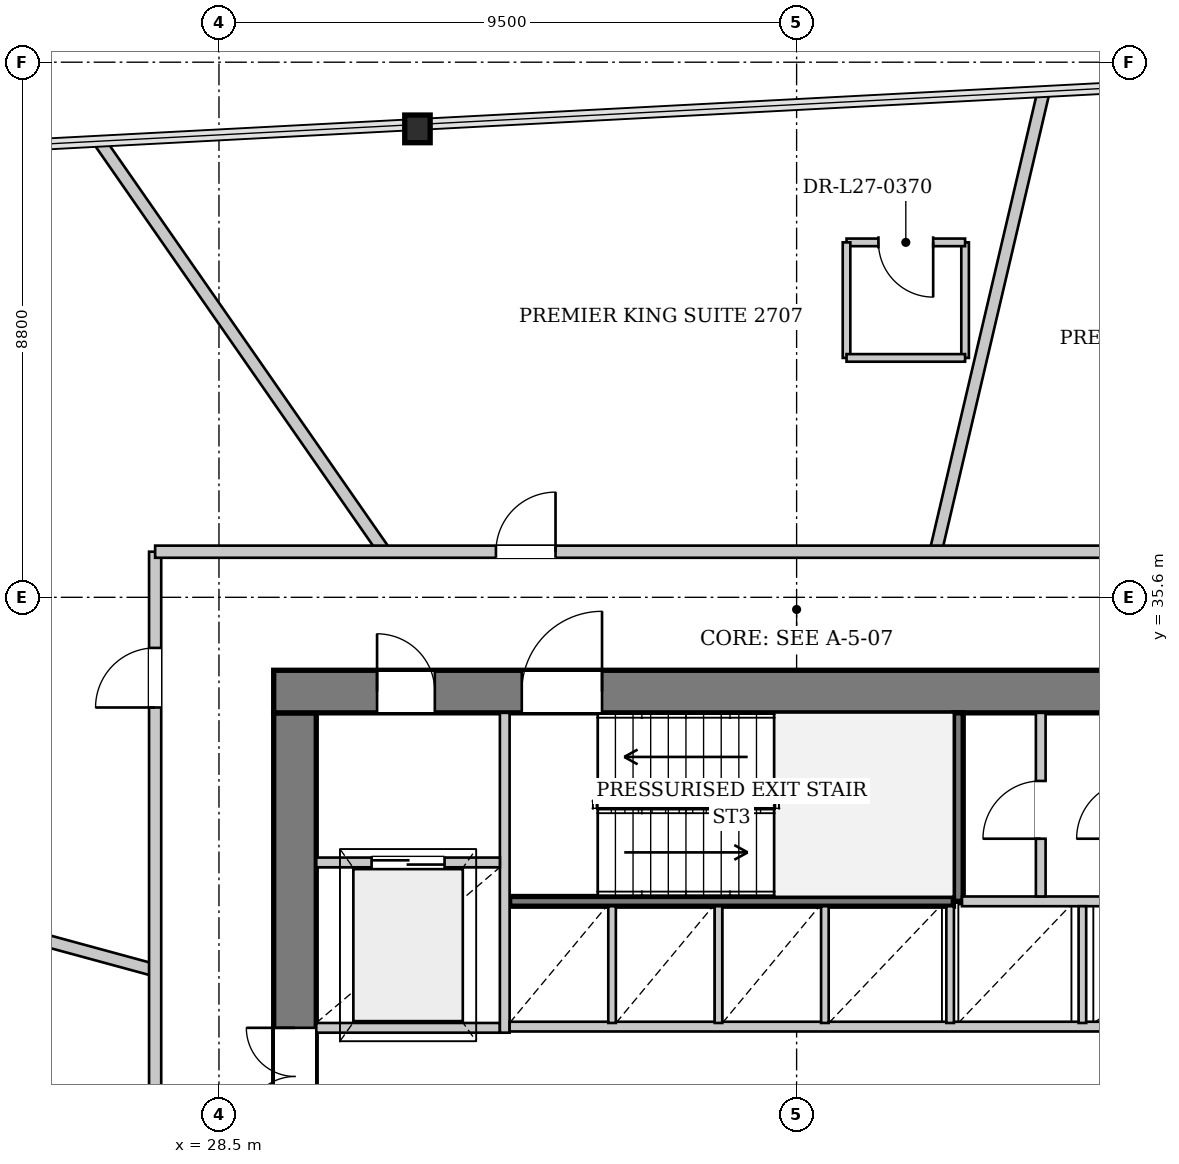
"""IFC4 building model, lengths in metres.
Left out: names, types, materials, properties, quantities, classifications, styles, units other than length and angle.
Written with IfcOpenShell. Run it as: python <this file> out.ifc"""

import sys

from ifc_helpers import new_model, si_unit, direction, frame, frame_2d, origin, origin_2d, place, context, subcontext, project, spatial, rectangle, i_section, extrude, source, transform, mapped, element, fill, save


model = new_model("IFC4")
c1 = context("Model", 3, precision=1e-05, world=origin(), true_north=direction((0.0, 1.0)))
c2 = subcontext(c1, "Body", "Model", "MODEL_VIEW")
j1 = project(units=[si_unit("LENGTHUNIT", "METRE"), si_unit("PLANEANGLEUNIT", "RADIAN")], contexts=[c1])
p1 = place(None, origin())
s1 = spatial("IfcSite", under=j1, at=p1, CompositionType="ELEMENT")
p2 = place(p1, origin())
s2 = spatial("IfcBuilding", under=s1, at=p2, CompositionType="ELEMENT")
p3 = place(p2, frame((0.0, 0.0, 105.7)))
s3 = spatial("IfcBuildingStorey", under=s2, at=p3, CompositionType="ELEMENT", Elevation=105.7)
m1 = source(origin(), c2, "Body", "SweptSolid", [
    extrude(i_section(OverallWidth=0.418, OverallDepth=0.455, WebThickness=0.038, FlangeThickness=0.059, at=origin_2d()), origin(), (0.0, 0.0, 1.0), 3.399),
])
p4 = place(p3, frame((31.897, 43.383, 0.0), z_axis=(-0.078216564077, -0.046685736134, 0.995842663851), x_axis=(0.512523153055, -0.858673405657, 0.0)))
e1 = element("IfcColumn", 1, at=p4, inside=s3, PredefinedType="COLUMN", context=c2, shape_type="MappedRepresentation", body=[
    mapped(m1, transform((0.0, 0.0, 0.0), x_axis=(1.0, 0.0, 0.0), y_axis=(0.0, 1.0, 0.0), z_axis=(0.0, 0.0, 1.0), scale=1.0)),
])
p5 = place(p3, frame((29.75, 19.5, 0.0), z_axis=(0.0, 0.0, 1.0), x_axis=(0.0, 1.0, 0.0)))
e2 = element("IfcWall", 2, at=p5, inside=s3, PredefinedType="SHEAR", context=c2, shape_type="SweptSolid", body=[
    extrude(rectangle(XDim=14.2, YDim=0.7, at=frame_2d((7.1, 0.0))), origin(), (0.0, 0.0, 1.0), 3.3),
])
p6 = place(p5, frame((7.42, 0.0, 0.0)))
e3 = element("IfcOpeningElement", 3, at=p6, cuts=e2, PredefinedType="OPENING", context=c2, shape_type="SweptSolid", body=[
    extrude(rectangle(XDim=1.6, YDim=2.2, at=frame_2d((0.8, 1.1))), frame((0.0, 0.36, 0.0), z_axis=(0.0, -1.0, 0.0), x_axis=(1.0, 0.0, 0.0)), (0.0, 0.0, 1.0), 0.72),
])
p7 = place(p3, frame((29.4, 34.05, 0.0), z_axis=(0.0, 0.0, 1.0), x_axis=(1.0, 0.0, 0.0)))
e4 = element("IfcWall", 4, at=p7, inside=s3, PredefinedType="SHEAR", context=c2, shape_type="SweptSolid", body=[
    extrude(rectangle(XDim=17.2, YDim=0.7, at=frame_2d((8.6, 0.0))), origin(), (0.0, 0.0, 1.0), 3.3),
])
p8 = place(p7, frame((1.7, 0.0, 0.0)))
e5 = element("IfcOpeningElement", 5, at=p8, cuts=e4, PredefinedType="OPENING", context=c2, shape_type="SweptSolid", body=[
    extrude(rectangle(XDim=0.95, YDim=2.1, at=frame_2d((0.475, 1.05))), frame((0.0, 0.36, 0.0), z_axis=(0.0, -1.0, 0.0), x_axis=(1.0, 0.0, 0.0)), (0.0, 0.0, 1.0), 0.72),
])
p9 = place(p7, frame((4.08, 0.0, 0.0)))
e6 = element("IfcOpeningElement", 6, at=p9, cuts=e4, PredefinedType="OPENING", context=c2, shape_type="SweptSolid", body=[
    extrude(rectangle(XDim=1.32, YDim=2.2, at=frame_2d((0.66, 1.1))), frame((0.0, 0.36, 0.0), z_axis=(0.0, -1.0, 0.0), x_axis=(1.0, 0.0, 0.0)), (0.0, 0.0, 1.0), 0.72),
])
p10 = place(p7, frame((15.15, 0.0, 0.0)))
e7 = element("IfcOpeningElement", 7, at=p10, cuts=e4, PredefinedType="OPENING", context=c2, shape_type="SweptSolid", body=[
    extrude(rectangle(XDim=0.95, YDim=2.1, at=frame_2d((0.475, 1.05))), frame((0.0, 0.36, 0.0), z_axis=(0.0, -1.0, 0.0), x_axis=(1.0, 0.0, 0.0)), (0.0, 0.0, 1.0), 0.72),
])
p11 = place(p3, frame((33.28, 30.6, 0.0), z_axis=(0.0, 0.0, 1.0), x_axis=(1.0, 0.0, 0.0)))
e8 = element("IfcWall", 8, at=p11, inside=s3, PredefinedType="PARTITIONING", context=c2, shape_type="SweptSolid", body=[
    extrude(rectangle(XDim=7.3, YDim=0.16, at=frame_2d((3.65, 0.0))), origin(), (0.0, 0.0, 1.0), 3.3),
])
p12 = place(p3, frame((40.66, 30.6, 0.0), z_axis=(0.0, 0.0, 1.0), x_axis=(0.0, 1.0, 0.0)))
e9 = element("IfcWall", 9, at=p12, inside=s3, PredefinedType="PARTITIONING", context=c2, shape_type="SweptSolid", body=[
    extrude(rectangle(XDim=3.1, YDim=0.16, at=frame_2d((1.55, 0.0))), origin(), (0.0, 0.0, 1.0), 3.3),
])
p13 = place(p3, frame((30.1, 28.52, 0.0), z_axis=(0.0, 0.0, 1.0), x_axis=(1.0, 0.0, 0.0)))
e10 = element("IfcWall", 10, at=p13, inside=s3, PredefinedType="PARTITIONING", context=c2, shape_type="SweptSolid", body=[
    extrude(rectangle(XDim=3.02, YDim=0.16, at=frame_2d((1.51, 0.0))), origin(), (0.0, 0.0, 1.0), 3.3),
])
p14 = place(p3, frame((33.2, 28.44, 0.0), z_axis=(0.0, 0.0, 1.0), x_axis=(0.0, 1.0, 0.0)))
e11 = element("IfcWall", 11, at=p14, inside=s3, PredefinedType="PARTITIONING", context=c2, shape_type="SweptSolid", body=[
    extrude(rectangle(XDim=5.26, YDim=0.16, at=frame_2d((2.63, 0.0))), origin(), (0.0, 0.0, 1.0), 3.3),
])
p15 = place(p3, frame((30.1, 31.24, 0.0), z_axis=(0.0, 0.0, 1.0), x_axis=(1.0, 0.0, 0.0)))
e12 = element("IfcWall", 12, at=p15, inside=s3, PredefinedType="PARTITIONING", context=c2, shape_type="SweptSolid", body=[
    extrude(rectangle(XDim=3.02, YDim=0.16, at=frame_2d((1.51, 0.0))), origin(), (0.0, 0.0, 1.0), 3.3),
])
p16 = place(p15, frame((0.91, 0.0, 0.0)))
e13 = element("IfcOpeningElement", 13, at=p16, cuts=e12, PredefinedType="OPENING", context=c2, shape_type="SweptSolid", body=[
    extrude(rectangle(XDim=1.2, YDim=2.2, at=frame_2d((0.6, 1.1))), frame((0.0, 0.09, 0.0), z_axis=(0.0, -1.0, 0.0), x_axis=(1.0, 0.0, 0.0)), (0.0, 0.0, 1.0), 0.18),
])
p17 = place(p3, frame((33.28, 28.54, 0.0), z_axis=(0.0, 0.0, 1.0), x_axis=(1.0, 0.0, 0.0)))
e14 = element("IfcWall", 14, at=p17, inside=s3, PredefinedType="PARTITIONING", context=c2, shape_type="SweptSolid", body=[
    extrude(rectangle(XDim=12.62, YDim=0.16, at=frame_2d((6.31, 0.0))), origin(), (0.0, 0.0, 1.0), 3.3),
])
p18 = place(p3, frame((40.72, 30.6, 0.0), z_axis=(0.0, 0.0, 1.0), x_axis=(1.0, 0.0, 0.0)))
e15 = element("IfcWall", 15, at=p18, inside=s3, PredefinedType="PARTITIONING", context=c2, shape_type="SweptSolid", body=[
    extrude(rectangle(XDim=5.18, YDim=0.16, at=frame_2d((2.59, 0.0))), origin(), (0.0, 0.0, 1.0), 3.3),
])
for number, where, z_axis, x_axis in (
    (16, (34.965, 28.6, 0.0), (0.0, 0.0, 1.0), (0.0, 1.0, 0.0)),
    (17, (36.715, 28.6, 0.0), (0.0, 0.0, 1.0), (0.0, 1.0, 0.0)),
    (18, (38.465, 28.6, 0.0), (0.0, 0.0, 1.0), (0.0, 1.0, 0.0)),
    (19, (40.525, 28.6, 0.0), (0.0, 0.0, 1.0), (0.0, 1.0, 0.0)),
    (20, (42.7, 28.6, 0.0), (0.0, 0.0, 1.0), (0.0, 1.0, 0.0)),
):
    element("IfcWall", number, at=place(p3, frame(where, z_axis=z_axis, x_axis=x_axis)), inside=s3, PredefinedType="PARTITIONING", context=c2, shape_type="SweptSolid", body=[
        extrude(rectangle(XDim=1.92, YDim=0.125, at=frame_2d((0.96, 0.0))), origin(), (0.0, 0.0, 1.0), 3.3),
    ])
p19 = place(p3, frame((42.015, 30.68, 0.0), z_axis=(0.0, 0.0, 1.0), x_axis=(0.0, 1.0, 0.0)))
e21 = element("IfcWall", 21, at=p19, inside=s3, PredefinedType="PARTITIONING", context=c2, shape_type="SweptSolid", body=[
    extrude(rectangle(XDim=3.02, YDim=0.16, at=frame_2d((1.51, 0.0))), origin(), (0.0, 0.0, 1.0), 3.3),
])
p20 = place(p19, frame((0.95, 0.0, 0.0)))
e22 = element("IfcOpeningElement", 22, at=p20, cuts=e21, PredefinedType="OPENING", context=c2, shape_type="SweptSolid", body=[
    extrude(rectangle(XDim=0.95, YDim=2.1, at=frame_2d((0.475, 1.05))), frame((0.0, 0.09, 0.0), z_axis=(0.0, -1.0, 0.0), x_axis=(1.0, 0.0, 0.0)), (0.0, 0.0, 1.0), 0.18),
])
p21 = place(p3, frame((40.287, 36.35, 0.0), z_axis=(0.0, 0.0, 1.0), x_axis=(0.22833612857, 0.973582360353, 0.0)))
e23 = element("IfcWall", 23, at=p21, inside=s3, PredefinedType="PARTITIONING", context=c2, shape_type="SweptSolid", body=[
    extrude(rectangle(XDim=7.741, YDim=0.2, at=frame_2d((3.871, 0.0))), origin(), (0.0, 0.0, 1.0), 3.3),
])
p22 = place(p3, frame((31.224, 36.35, 0.0), z_axis=(0.0, 0.0, 1.0), x_axis=(-0.570714905011, 0.821148279666, 0.0)))
e24 = element("IfcWall", 24, at=p22, inside=s3, PredefinedType="PARTITIONING", context=c2, shape_type="SweptSolid", body=[
    extrude(rectangle(XDim=8.186, YDim=0.2, at=frame_2d((4.093, 0.0))), origin(), (0.0, 0.0, 1.0), 3.3),
])
p23 = place(p3, frame((27.45, 29.466, 0.0), z_axis=(0.0, 0.0, 1.0), x_axis=(-0.96501587625, 0.262191454065, 0.0)))
e25 = element("IfcWall", 25, at=p23, inside=s3, PredefinedType="PARTITIONING", context=c2, shape_type="SweptSolid", body=[
    extrude(rectangle(XDim=10.777, YDim=0.2, at=frame_2d((5.389, 0.0))), origin(), (0.0, 0.0, 1.0), 3.3),
])
p24 = place(p3, frame((40.771, 39.537, 0.0), z_axis=(0.0, 0.0, 1.0), x_axis=(0.0, 1.0, 0.0)))
e26 = element("IfcWall", 26, at=p24, inside=s3, PredefinedType="PARTITIONING", context=c2, shape_type="SweptSolid", body=[
    extrude(rectangle(XDim=1.9, YDim=0.125, at=frame_2d((0.95, 0.0))), origin(), (0.0, 0.0, 1.0), 3.3),
])
p25 = place(p3, frame((40.771, 41.437, 0.0), z_axis=(0.0, 0.0, 1.0), x_axis=(-1.0, 0.0, 0.0)))
e27 = element("IfcWall", 27, at=p25, inside=s3, PredefinedType="PARTITIONING", context=c2, shape_type="SweptSolid", body=[
    extrude(rectangle(XDim=1.95, YDim=0.125, at=frame_2d((0.975, 0.0))), origin(), (0.0, 0.0, 1.0), 3.3),
])
p26 = place(p25, frame((0.525, 0.0, 0.0)))
e28 = element("IfcOpeningElement", 28, at=p26, cuts=e27, PredefinedType="OPENING", context=c2, shape_type="SweptSolid", body=[
    extrude(rectangle(XDim=0.9, YDim=2.1, at=frame_2d((0.45, 1.05))), frame((0.0, 0.073, 0.0), z_axis=(0.0, -1.0, 0.0), x_axis=(1.0, 0.0, 0.0)), (0.0, 0.0, 1.0), 0.145),
])
p27 = place(p3, frame((38.821, 41.437, 0.0), z_axis=(0.0, 0.0, 1.0), x_axis=(0.0, -1.0, 0.0)))
e29 = element("IfcWall", 29, at=p27, inside=s3, PredefinedType="PARTITIONING", context=c2, shape_type="SweptSolid", body=[
    extrude(rectangle(XDim=1.9, YDim=0.125, at=frame_2d((0.95, 0.0))), origin(), (0.0, 0.0, 1.0), 3.3),
])
p28 = place(p3, frame((38.821, 39.537, 0.0), z_axis=(0.0, 0.0, 1.0), x_axis=(1.0, 0.0, 0.0)))
e30 = element("IfcWall", 30, at=p28, inside=s3, PredefinedType="PARTITIONING", context=c2, shape_type="SweptSolid", body=[
    extrude(rectangle(XDim=1.95, YDim=0.125, at=frame_2d((0.975, 0.0))), origin(), (0.0, 0.0, 1.0), 3.3),
])
p29 = place(p3, frame((27.45, 16.85, 0.0), z_axis=(0.0, 0.0, 1.0), x_axis=(0.0, 1.0, 0.0)))
e31 = element("IfcWall", 31, at=p29, inside=s3, PredefinedType="PARTITIONING", context=c2, shape_type="SweptSolid", body=[
    extrude(rectangle(XDim=19.5, YDim=0.2, at=frame_2d((9.75, 0.0))), origin(), (0.0, 0.0, 1.0), 3.3),
])
p30 = place(p29, frame((16.938, 0.0, 0.0)))
e32 = element("IfcOpeningElement", 32, at=p30, cuts=e31, PredefinedType="OPENING", context=c2, shape_type="SweptSolid", body=[
    extrude(rectangle(XDim=0.98, YDim=2.15, at=frame_2d((0.49, 1.075))), frame((0.0, 0.11, 0.0), z_axis=(0.0, -1.0, 0.0), x_axis=(1.0, 0.0, 0.0)), (0.0, 0.0, 1.0), 0.22),
])
p31 = place(p29, frame((9.597, 0.0, 0.0)))
e33 = element("IfcOpeningElement", 33, at=p31, cuts=e31, PredefinedType="OPENING", context=c2, shape_type="SweptSolid", body=[
    extrude(rectangle(XDim=0.98, YDim=2.15, at=frame_2d((0.49, 1.075))), frame((0.0, 0.11, 0.0), z_axis=(0.0, -1.0, 0.0), x_axis=(1.0, 0.0, 0.0)), (0.0, 0.0, 1.0), 0.22),
])
p32 = place(p3, frame((27.45, 36.35, 0.0), z_axis=(0.0, 0.0, 1.0), x_axis=(1.0, 0.0, 0.0)))
e34 = element("IfcWall", 34, at=p32, inside=s3, PredefinedType="PARTITIONING", context=c2, shape_type="SweptSolid", body=[
    extrude(rectangle(XDim=21.1, YDim=0.2, at=frame_2d((10.55, 0.0))), origin(), (0.0, 0.0, 1.0), 3.3),
])
p33 = place(p32, frame((19.82, 0.0, 0.0)))
e35 = element("IfcOpeningElement", 35, at=p33, cuts=e34, PredefinedType="OPENING", context=c2, shape_type="SweptSolid", body=[
    extrude(rectangle(XDim=0.98, YDim=2.15, at=frame_2d((0.49, 1.075))), frame((0.0, 0.11, 0.0), z_axis=(0.0, -1.0, 0.0), x_axis=(1.0, 0.0, 0.0)), (0.0, 0.0, 1.0), 0.22),
])
p34 = place(p32, frame((5.605, 0.0, 0.0)))
e36 = element("IfcOpeningElement", 36, at=p34, cuts=e34, PredefinedType="OPENING", context=c2, shape_type="SweptSolid", body=[
    extrude(rectangle(XDim=0.98, YDim=2.15, at=frame_2d((0.49, 1.075))), frame((0.0, 0.11, 0.0), z_axis=(0.0, -1.0, 0.0), x_axis=(1.0, 0.0, 0.0)), (0.0, 0.0, 1.0), 0.22),
])
m2 = source(origin(), c2, "Body", "SweptSolid", [
    extrude(rectangle(XDim=1.6, YDim=2.2, at=frame_2d((0.8, 1.1))), frame((0.0, 0.025, 0.0), z_axis=(0.0, -1.0, 0.0), x_axis=(1.0, 0.0, 0.0)), (0.0, 0.0, 1.0), 0.05),
])
p35 = place(p6, origin())
e37 = element("IfcDoor", 37, at=p35, inside=s3, OperationType="DOUBLE_DOOR_SINGLE_SWING", PredefinedType="DOOR", context=c2, shape_type="MappedRepresentation", body=[
    mapped(m2, transform((0.0, 0.0, 0.0), x_axis=(1.0, 0.0, 0.0), y_axis=(0.0, 1.0, 0.0), z_axis=(0.0, 0.0, 1.0), scale=1.0)),
])
fill(e3, e37)
m3 = source(origin(), c2, "Body", "SweptSolid", [
    extrude(rectangle(XDim=0.95, YDim=2.1, at=frame_2d((0.475, 1.05))), frame((0.0, 0.025, 0.0), z_axis=(0.0, -1.0, 0.0), x_axis=(1.0, 0.0, 0.0)), (0.0, 0.0, 1.0), 0.05),
])
p36 = place(p8, origin())
e38 = element("IfcDoor", 38, at=p36, inside=s3, OperationType="SINGLE_SWING_LEFT", PredefinedType="DOOR", context=c2, shape_type="MappedRepresentation", body=[
    mapped(m3, transform((0.0, 0.0, 0.0), x_axis=(1.0, 0.0, 0.0), y_axis=(0.0, 1.0, 0.0), z_axis=(0.0, 0.0, 1.0), scale=1.0)),
])
fill(e5, e38)
m4 = source(origin(), c2, "Body", "SweptSolid", [
    extrude(rectangle(XDim=1.32, YDim=2.2, at=frame_2d((0.66, 1.1))), frame((0.0, 0.025, 0.0), z_axis=(0.0, -1.0, 0.0), x_axis=(1.0, 0.0, 0.0)), (0.0, 0.0, 1.0), 0.05),
])
p37 = place(p9, origin())
e39 = element("IfcDoor", 39, at=p37, inside=s3, OperationType="SINGLE_SWING_RIGHT", PredefinedType="DOOR", context=c2, shape_type="MappedRepresentation", body=[
    mapped(m4, transform((0.0, 0.0, 0.0), x_axis=(1.0, 0.0, 0.0), y_axis=(0.0, 1.0, 0.0), z_axis=(0.0, 0.0, 1.0), scale=1.0)),
])
fill(e6, e39)
m5 = source(origin(), c2, "Body", "SweptSolid", [
    extrude(rectangle(XDim=1.2, YDim=2.2, at=frame_2d((0.6, 1.1))), frame((0.0, 0.025, 0.0), z_axis=(0.0, -1.0, 0.0), x_axis=(1.0, 0.0, 0.0)), (0.0, 0.0, 1.0), 0.05),
])
p38 = place(p16, origin())
e40 = element("IfcDoor", 40, at=p38, inside=s3, OperationType="DOUBLE_DOOR_SLIDING", PredefinedType="DOOR", context=c2, shape_type="MappedRepresentation", body=[
    mapped(m5, transform((0.0, 0.0, 0.0), x_axis=(1.0, 0.0, 0.0), y_axis=(0.0, 1.0, 0.0), z_axis=(0.0, 0.0, 1.0), scale=1.0)),
])
fill(e13, e40)
p39 = place(p20, origin())
e41 = element("IfcDoor", 41, at=p39, inside=s3, OperationType="SINGLE_SWING_LEFT", PredefinedType="DOOR", context=c2, shape_type="MappedRepresentation", body=[
    mapped(m3, transform((0.0, 0.0, 0.0), x_axis=(1.0, 0.0, 0.0), y_axis=(0.0, 1.0, 0.0), z_axis=(0.0, 0.0, 1.0), scale=1.0)),
])
fill(e22, e41)
m6 = source(origin(), c2, "Body", "SweptSolid", [
    extrude(rectangle(XDim=0.9, YDim=2.1, at=frame_2d((0.45, 1.05))), frame((0.0, 0.025, 0.0), z_axis=(0.0, -1.0, 0.0), x_axis=(1.0, 0.0, 0.0)), (0.0, 0.0, 1.0), 0.05),
])
p40 = place(p26, origin())
e42 = element("IfcDoor", 42, at=p40, inside=s3, OperationType="SINGLE_SWING_LEFT", PredefinedType="DOOR", context=c2, shape_type="MappedRepresentation", body=[
    mapped(m6, transform((0.0, 0.0, 0.0), x_axis=(1.0, 0.0, 0.0), y_axis=(0.0, 1.0, 0.0), z_axis=(0.0, 0.0, 1.0), scale=1.0)),
])
fill(e28, e42)
m7 = source(origin(), c2, "Body", "SweptSolid", [
    extrude(rectangle(XDim=0.98, YDim=2.15, at=frame_2d((0.49, 1.075))), frame((0.0, 0.025, 0.0), z_axis=(0.0, -1.0, 0.0), x_axis=(1.0, 0.0, 0.0)), (0.0, 0.0, 1.0), 0.05),
])
p41 = place(p30, origin())
e43 = element("IfcDoor", 43, at=p41, inside=s3, OperationType="SINGLE_SWING_LEFT", PredefinedType="DOOR", context=c2, shape_type="MappedRepresentation", body=[
    mapped(m7, transform((0.0, 0.0, 0.0), x_axis=(1.0, 0.0, 0.0), y_axis=(0.0, 1.0, 0.0), z_axis=(0.0, 0.0, 1.0), scale=1.0)),
])
fill(e32, e43)
p42 = place(p34, origin())
e44 = element("IfcDoor", 44, at=p42, inside=s3, OperationType="SINGLE_SWING_RIGHT", PredefinedType="DOOR", context=c2, shape_type="MappedRepresentation", body=[
    mapped(m7, transform((0.0, 0.0, 0.0), x_axis=(1.0, 0.0, 0.0), y_axis=(0.0, 1.0, 0.0), z_axis=(0.0, 0.0, 1.0), scale=1.0)),
])
fill(e36, e44)
save(model, sys.argv[1])
